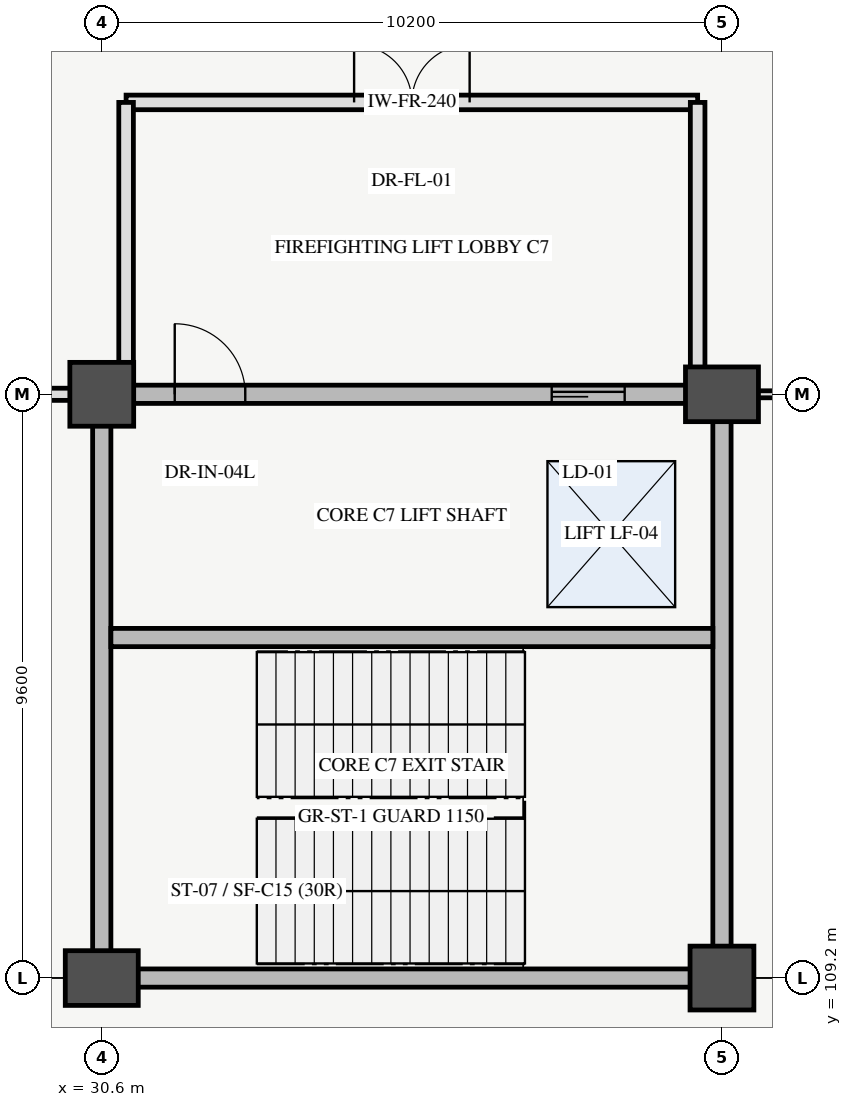
"""IFC4 building model, lengths in metres.
Left out: names, types, materials, properties, quantities, classifications, styles, units other than length and angle.
Written with IfcOpenShell. Run it as: python <this file> out.ifc"""

import sys

from ifc_helpers import new_model, si_unit, direction, frame, frame_2d, origin, origin_2d, place, context, subcontext, project, spatial, rectangle, extrude, element, fill, save


model = new_model("IFC4")
c1 = context("Model", 3, precision=1e-05, world=origin(), true_north=direction((0.0, 1.0)))
c2 = subcontext(c1, "Body", "Model", "MODEL_VIEW")
j1 = project(units=[si_unit("LENGTHUNIT", "METRE"), si_unit("PLANEANGLEUNIT", "RADIAN")], contexts=[c1])
p1 = place(None, origin())
s1 = spatial("IfcSite", under=j1, at=p1, CompositionType="ELEMENT")
p2 = place(p1, origin())
s2 = spatial("IfcBuilding", under=s1, at=p2, CompositionType="ELEMENT")
p3 = place(p2, frame((0.0, 0.0, -4.5)))
s3 = spatial("IfcBuildingStorey", under=s2, at=p3, CompositionType="ELEMENT", Elevation=-4.5)
p4 = place(p3, frame((30.6, 109.2, 0.0), z_axis=(0.0, 0.0, 1.0), x_axis=(1.0, 0.0, 0.0)))
e1 = element("IfcColumn", 1, at=p4, inside=s3, PredefinedType="COLUMN", context=c2, shape_type="SweptSolid", body=[
    extrude(rectangle(XDim=1.2, YDim=0.9, at=origin_2d()), origin(), (0.0, 0.0, 1.0), 4.5),
])
for number, where, z_axis, x_axis in (
    (2, (30.6, 118.8, 0.0), (0.0, 0.0, 1.0), (1.0, 0.0, 0.0)),
    (3, (40.8, 109.2, 0.0), (0.0, 0.0, 1.0), (1.0, 0.0, 0.0)),
):
    element("IfcColumn", number, at=place(p3, frame(where, z_axis=z_axis, x_axis=x_axis)), inside=s3, PredefinedType="COLUMN", context=c2, shape_type="SweptSolid", body=[
        extrude(rectangle(XDim=1.05, YDim=1.05, at=origin_2d()), origin(), (0.0, 0.0, 1.0), 4.5),
    ])
p5 = place(p3, frame((40.8, 118.8, 0.0), z_axis=(0.0, 0.0, 1.0), x_axis=(1.0, 0.0, 0.0)))
e4 = element("IfcColumn", 4, at=p5, inside=s3, PredefinedType="COLUMN", context=c2, shape_type="SweptSolid", body=[
    extrude(rectangle(XDim=1.2, YDim=0.9, at=origin_2d()), origin(), (0.0, 0.0, 1.0), 4.5),
])
p6 = place(p3, frame((30.6, 109.2, 0.0), z_axis=(0.0, 0.0, 1.0), x_axis=(1.0, 0.0, 0.0)))
e5 = element("IfcWall", 5, at=p6, inside=s3, PredefinedType="SHEAR", context=c2, shape_type="SweptSolid", body=[
    extrude(rectangle(XDim=10.2, YDim=0.3, at=frame_2d((5.1, 0.0))), origin(), (0.0, 0.0, 1.0), 4.5),
])
p7 = place(p3, frame((30.6, 118.8, 0.0), z_axis=(0.0, 0.0, 1.0), x_axis=(1.0, 0.0, 0.0)))
e6 = element("IfcWall", 6, at=p7, inside=s3, PredefinedType="SHEAR", context=c2, shape_type="SweptSolid", body=[
    extrude(rectangle(XDim=10.2, YDim=0.3, at=frame_2d((5.1, 0.0))), origin(), (0.0, 0.0, 1.0), 4.5),
])
p8 = place(p7, frame((1.2, 0.0, 0.0)))
e7 = element("IfcOpeningElement", 7, at=p8, cuts=e6, PredefinedType="OPENING", context=c2, shape_type="SweptSolid", body=[
    extrude(rectangle(XDim=1.16, YDim=2.2, at=frame_2d((0.58, 1.1))), frame((0.0, 0.16, 0.0), z_axis=(0.0, -1.0, 0.0), x_axis=(1.0, 0.0, 0.0)), (0.0, 0.0, 1.0), 0.32),
])
p9 = place(p7, frame((7.4, 0.0, 0.0)))
e8 = element("IfcOpeningElement", 8, at=p9, cuts=e6, PredefinedType="OPENING", context=c2, shape_type="SweptSolid", body=[
    extrude(rectangle(XDim=1.2, YDim=2.25, at=frame_2d((0.6, 1.125))), frame((0.0, 0.16, 0.0), z_axis=(0.0, -1.0, 0.0), x_axis=(1.0, 0.0, 0.0)), (0.0, 0.0, 1.0), 0.32),
])
for number, where, z_axis, x_axis in (
    (9, (30.6, 109.2, 0.0), (0.0, 0.0, 1.0), (0.0, 1.0, 0.0)),
    (10, (40.8, 109.2, 0.0), (0.0, 0.0, 1.0), (0.0, 1.0, 0.0)),
):
    element("IfcWall", number, at=place(p3, frame(where, z_axis=z_axis, x_axis=x_axis)), inside=s3, PredefinedType="SHEAR", context=c2, shape_type="SweptSolid", body=[
        extrude(rectangle(XDim=9.6, YDim=0.3, at=frame_2d((4.8, 0.0))), origin(), (0.0, 0.0, 1.0), 4.5),
    ])
p10 = place(p3, frame((30.75, 114.8, 0.0), z_axis=(0.0, 0.0, 1.0), x_axis=(1.0, 0.0, 0.0)))
e11 = element("IfcWall", 11, at=p10, inside=s3, PredefinedType="SHEAR", context=c2, shape_type="SweptSolid", body=[
    extrude(rectangle(XDim=9.9, YDim=0.3, at=frame_2d((4.95, 0.0))), origin(), (0.0, 0.0, 1.0), 4.5),
])
p11 = place(p3, frame((31.0, 123.6, 0.0), z_axis=(0.0, 0.0, 1.0), x_axis=(1.0, 0.0, 0.0)))
e12 = element("IfcWall", 12, at=p11, inside=s3, PredefinedType="PARTITIONING", context=c2, shape_type="SweptSolid", body=[
    extrude(rectangle(XDim=9.4, YDim=0.24, at=frame_2d((4.7, 0.0))), origin(), (0.0, 0.0, 1.0), 2.75),
])
p12 = place(p11, frame((3.75, 0.0, 0.0)))
e13 = element("IfcOpeningElement", 13, at=p12, cuts=e12, PredefinedType="OPENING", context=c2, shape_type="SweptSolid", body=[
    extrude(rectangle(XDim=1.9, YDim=2.25, at=frame_2d((0.95, 1.125))), frame((0.0, 0.13, 0.0), z_axis=(0.0, -1.0, 0.0), x_axis=(1.0, 0.0, 0.0)), (0.0, 0.0, 1.0), 0.26),
])
for number, where, z_axis, x_axis in (
    (14, (40.4, 119.0, 0.0), (0.0, 0.0, 1.0), (0.0, 1.0, 0.0)),
    (15, (31.0, 119.0, 0.0), (0.0, 0.0, 1.0), (0.0, 1.0, 0.0)),
):
    element("IfcWall", number, at=place(p3, frame(where, z_axis=z_axis, x_axis=x_axis)), inside=s3, PredefinedType="PARTITIONING", context=c2, shape_type="SweptSolid", body=[
        extrude(rectangle(XDim=4.6, YDim=0.24, at=frame_2d((2.3, 0.0))), origin(), (0.0, 0.0, 1.0), 2.75),
    ])
p13 = place(p3, frame((41.2, 118.8, 0.0), z_axis=(0.0, 0.0, 1.0), x_axis=(1.0, 0.0, 0.0)))
e16 = element("IfcWall", 16, at=p13, inside=s3, PredefinedType="PARTITIONING", context=c2, shape_type="SweptSolid", body=[
    extrude(rectangle(XDim=9.4, YDim=0.115, at=frame_2d((4.7, 0.0))), origin(), (0.0, 0.0, 1.0), 2.75),
])
p14 = place(p13, frame((4.21, 0.0, 0.0)))
e17 = element("IfcOpeningElement", 17, at=p14, cuts=e16, PredefinedType="OPENING", context=c2, shape_type="SweptSolid", body=[
    extrude(rectangle(XDim=0.98, YDim=2.12, at=frame_2d((0.49, 1.06))), frame((0.0, 0.067, 0.0), z_axis=(0.0, -1.0, 0.0), x_axis=(1.0, 0.0, 0.0)), (0.0, 0.0, 1.0), 0.135),
])
p15 = place(p3, frame((20.8, 118.8, 0.0), z_axis=(0.0, 0.0, 1.0), x_axis=(1.0, 0.0, 0.0)))
e18 = element("IfcWall", 18, at=p15, inside=s3, PredefinedType="PARTITIONING", context=c2, shape_type="SweptSolid", body=[
    extrude(rectangle(XDim=9.4, YDim=0.2, at=frame_2d((4.7, 0.0))), origin(), (0.0, 0.0, 1.0), 2.75),
])
p16 = place(p15, frame((4.16, 0.0, 0.0)))
e19 = element("IfcOpeningElement", 19, at=p16, cuts=e18, PredefinedType="OPENING", context=c2, shape_type="SweptSolid", body=[
    extrude(rectangle(XDim=1.08, YDim=2.18, at=frame_2d((0.54, 1.09))), frame((0.0, 0.11, 0.0), z_axis=(0.0, -1.0, 0.0), x_axis=(1.0, 0.0, 0.0)), (0.0, 0.0, 1.0), 0.22),
])
p17 = place(p8, origin())
e20 = element("IfcDoor", 20, at=p17, inside=s3, OperationType="SINGLE_SWING_LEFT", PredefinedType="DOOR", context=c2, shape_type="SweptSolid", body=[
    extrude(rectangle(XDim=1.16, YDim=2.2, at=frame_2d((0.58, 1.1))), frame((0.0, 0.025, 0.0), z_axis=(0.0, -1.0, 0.0), x_axis=(1.0, 0.0, 0.0)), (0.0, 0.0, 1.0), 0.05),
])
fill(e7, e20)
p18 = place(p9, origin())
e21 = element("IfcDoor", 21, at=p18, inside=s3, OperationType="SLIDING_TO_LEFT", PredefinedType="DOOR", context=c2, shape_type="SweptSolid", body=[
    extrude(rectangle(XDim=1.2, YDim=2.25, at=frame_2d((0.6, 1.125))), frame((0.0, 0.025, 0.0), z_axis=(0.0, -1.0, 0.0), x_axis=(1.0, 0.0, 0.0)), (0.0, 0.0, 1.0), 0.05),
])
fill(e8, e21)
p19 = place(p12, origin())
e22 = element("IfcDoor", 22, at=p19, inside=s3, OperationType="DOUBLE_DOOR_SINGLE_SWING", PredefinedType="DOOR", context=c2, shape_type="SweptSolid", body=[
    extrude(rectangle(XDim=1.9, YDim=2.25, at=frame_2d((0.95, 1.125))), frame((0.0, 0.025, 0.0), z_axis=(0.0, -1.0, 0.0), x_axis=(1.0, 0.0, 0.0)), (0.0, 0.0, 1.0), 0.05),
])
fill(e13, e22)
save(model, sys.argv[1])
